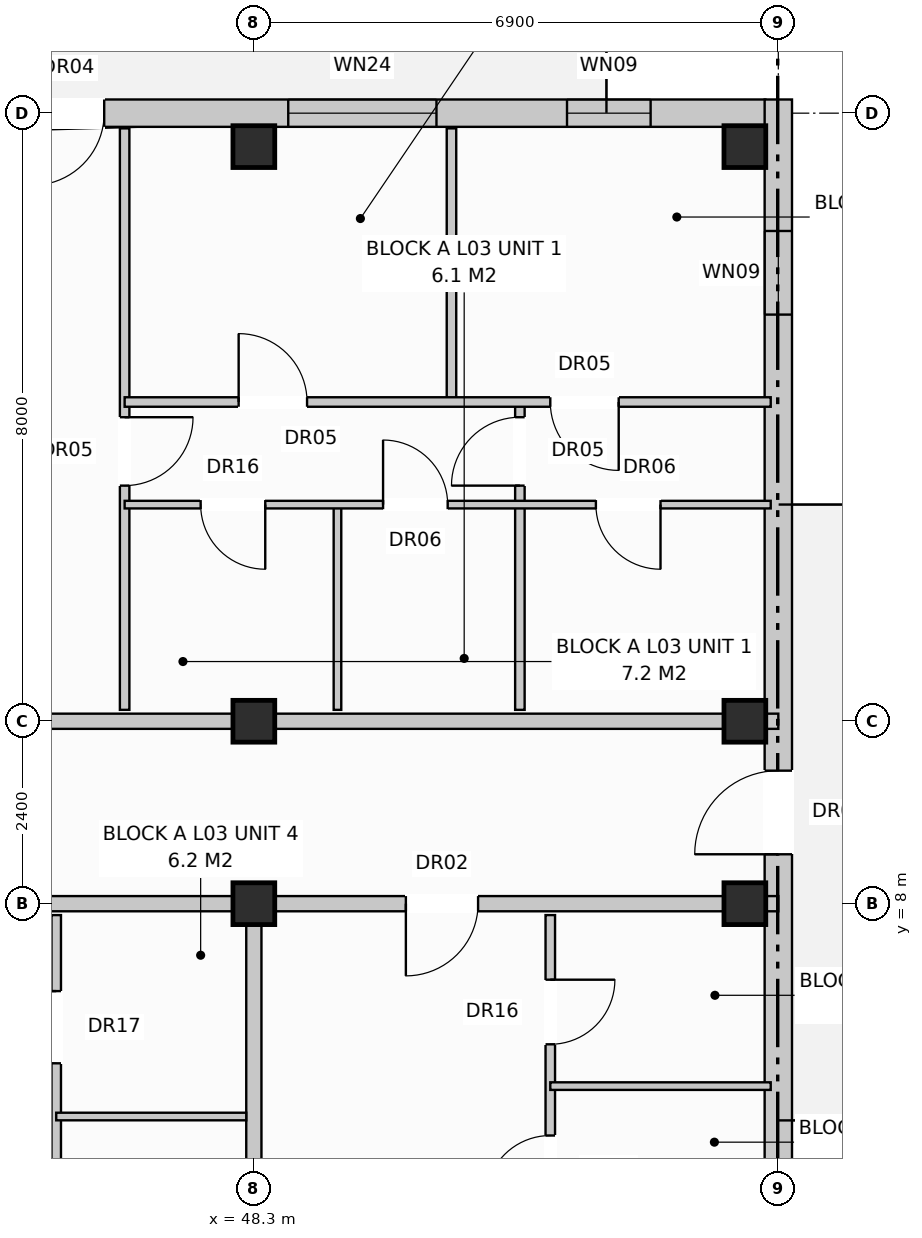
"""IFC4 building model, lengths in metres.
Left out: names, types, materials, properties, quantities, classifications, styles, units other than length and angle.
Written with IfcOpenShell. Run it as: python <this file> out.ifc"""

import sys

from ifc_helpers import new_model, si_unit, direction, frame, frame_2d, origin, origin_with_axes, origin_2d, place, context, subcontext, project, spatial, rectangle, extrude, element, fill, save


model = new_model("IFC4")
c1 = context("Model", 3, precision=1e-05, world=origin(), true_north=direction((0.0, 1.0)))
c2 = subcontext(c1, "Body", "Model", "MODEL_VIEW")
j1 = project(units=[si_unit("LENGTHUNIT", "METRE"), si_unit("PLANEANGLEUNIT", "RADIAN")], contexts=[c1])
p1 = place(None, origin())
s1 = spatial("IfcSite", under=j1, at=p1, CompositionType="ELEMENT")
p2 = place(p1, origin())
s2 = spatial("IfcBuilding", under=s1, at=p2, CompositionType="ELEMENT")
p3 = place(p2, frame((0.0, 0.0, 11.2)))
s3 = spatial("IfcBuildingStorey", under=s2, at=p3, CompositionType="ELEMENT", Elevation=11.2)
for number, where, z_axis, x_axis in (
    (1, (48.3, 8.0, 0.0), (0.0, 0.0, 1.0), (1.0, 0.0, 0.0)),
    (2, (48.3, 10.4, 0.0), (0.0, 0.0, 1.0), (1.0, 0.0, 0.0)),
    (3, (48.3, 17.96, 0.0), (0.0, 0.0, 1.0), (1.0, 0.0, 0.0)),
    (4, (54.76, 8.0, 0.0), (0.0, 0.0, 1.0), (1.0, 0.0, 0.0)),
    (5, (54.76, 10.4, 0.0), (0.0, 0.0, 1.0), (1.0, 0.0, 0.0)),
    (6, (54.76, 17.96, 0.0), (0.0, 0.0, 1.0), (1.0, 0.0, 0.0)),
):
    element("IfcColumn", number, at=place(p3, frame(where, z_axis=z_axis, x_axis=x_axis)), inside=s3, PredefinedType="COLUMN", context=c2, shape_type="SweptSolid", body=[
        extrude(rectangle(XDim=0.55, YDim=0.55, at=origin_2d()), origin(), (0.0, 0.0, 1.0), 3.2),
    ])
p4 = place(p3, frame((31.35, 18.4, 0.0), z_axis=(0.0, 0.0, 1.0), x_axis=(1.0, 0.0, 0.0)))
e7 = element("IfcWall", 7, at=p4, inside=s3, PredefinedType="STANDARD", context=c2, shape_type="SweptSolid", body=[
    extrude(rectangle(XDim=23.68, YDim=0.36, at=frame_2d((11.84, 0.0))), origin(), (0.0, 0.0, 1.0), 2.94),
])
p5 = place(p4, frame((14.031, 0.0, 0.0)))
e8 = element("IfcOpeningElement", 8, at=p5, cuts=e7, PredefinedType="OPENING", context=c2, shape_type="SweptSolid", body=[
    extrude(rectangle(XDim=0.95, YDim=2.1, at=frame_2d((0.475, 1.05))), frame((0.0, 0.192, 0.0), z_axis=(0.0, -1.0, 0.0), x_axis=(1.0, 0.0, 0.0)), (0.0, 0.0, 1.0), 0.384),
])
p6 = place(p4, frame((11.77, 0.0, 0.8)))
e9 = element("IfcOpeningElement", 9, at=p6, cuts=e7, PredefinedType="OPENING", context=c2, shape_type="SweptSolid", body=[
    extrude(rectangle(XDim=1.9, YDim=1.85, at=frame_2d((0.95, 0.925))), frame((0.0, 0.192, 0.0), z_axis=(0.0, -1.0, 0.0), x_axis=(1.0, 0.0, 0.0)), (0.0, 0.0, 1.0), 0.384),
])
p7 = place(p4, frame((17.403, 0.0, 0.8)))
e10 = element("IfcOpeningElement", 10, at=p7, cuts=e7, PredefinedType="OPENING", context=c2, shape_type="SweptSolid", body=[
    extrude(rectangle(XDim=1.95, YDim=1.65, at=frame_2d((0.975, 0.825))), frame((0.0, 0.192, 0.0), z_axis=(0.0, -1.0, 0.0), x_axis=(1.0, 0.0, 0.0)), (0.0, 0.0, 1.0), 0.384),
])
p8 = place(p4, frame((21.07, 0.0, 0.72)))
e11 = element("IfcOpeningElement", 11, at=p8, cuts=e7, PredefinedType="OPENING", context=c2, shape_type="SweptSolid", body=[
    extrude(rectangle(XDim=1.1, YDim=1.5, at=frame_2d((0.55, 0.75))), frame((0.0, 0.192, 0.0), z_axis=(0.0, -1.0, 0.0), x_axis=(1.0, 0.0, 0.0)), (0.0, 0.0, 1.0), 0.384),
])
p9 = place(p3, frame((55.2, -0.18, 0.0), z_axis=(0.0, 0.0, 1.0), x_axis=(0.0, 1.0, 0.0)))
e12 = element("IfcWall", 12, at=p9, inside=s3, PredefinedType="STANDARD", context=c2, shape_type="SweptSolid", body=[
    extrude(rectangle(XDim=18.76, YDim=0.36, at=frame_2d((9.38, 0.0))), origin(), (0.0, 0.0, 1.0), 2.94),
])
p10 = place(p9, frame((8.83, 0.0, 0.0)))
e13 = element("IfcOpeningElement", 13, at=p10, cuts=e12, PredefinedType="OPENING", context=c2, shape_type="SweptSolid", body=[
    extrude(rectangle(XDim=1.1, YDim=2.1, at=frame_2d((0.55, 1.05))), frame((0.0, 0.192, 0.0), z_axis=(0.0, -1.0, 0.0), x_axis=(1.0, 0.0, 0.0)), (0.0, 0.0, 1.0), 0.384),
])
p11 = place(p9, frame((1.73, 0.0, 0.72)))
e14 = element("IfcOpeningElement", 14, at=p11, cuts=e12, PredefinedType="OPENING", context=c2, shape_type="SweptSolid", body=[
    extrude(rectangle(XDim=1.1, YDim=1.5, at=frame_2d((0.55, 0.75))), frame((0.0, 0.192, 0.0), z_axis=(0.0, -1.0, 0.0), x_axis=(1.0, 0.0, 0.0)), (0.0, 0.0, 1.0), 0.384),
])
p12 = place(p9, frame((15.93, 0.0, 0.72)))
e15 = element("IfcOpeningElement", 15, at=p12, cuts=e12, PredefinedType="OPENING", context=c2, shape_type="SweptSolid", body=[
    extrude(rectangle(XDim=1.1, YDim=1.5, at=frame_2d((0.55, 0.75))), frame((0.0, 0.192, 0.0), z_axis=(0.0, -1.0, 0.0), x_axis=(1.0, 0.0, 0.0)), (0.0, 0.0, 1.0), 0.384),
])
p13 = place(p3, frame((48.3, 7.85, 0.0), z_axis=(0.0, 0.0, 1.0), x_axis=(0.0, -1.0, 0.0)))
e16 = element("IfcWall", 16, at=p13, inside=s3, PredefinedType="PARTITIONING", context=c2, shape_type="SweptSolid", body=[
    extrude(rectangle(XDim=7.7, YDim=0.2, at=frame_2d((3.85, 0.0))), origin(), (0.0, 0.0, 1.0), 2.38),
])
p14 = place(p3, frame((41.4, 8.0, 0.0), z_axis=(0.0, 0.0, 1.0), x_axis=(1.0, 0.0, 0.0)))
e17 = element("IfcWall", 17, at=p14, inside=s3, PredefinedType="PARTITIONING", context=c2, shape_type="SweptSolid", body=[
    extrude(rectangle(XDim=6.9, YDim=0.2, at=frame_2d((3.45, 0.0))), origin(), (0.0, 0.0, 1.0), 2.38),
])
p15 = place(p14, frame((2.0, 0.0, 0.0)))
e18 = element("IfcOpeningElement", 18, at=p15, cuts=e17, PredefinedType="OPENING", context=c2, shape_type="SweptSolid", body=[
    extrude(rectangle(XDim=0.95, YDim=2.15, at=frame_2d((0.475, 1.075))), frame((0.0, 0.112, 0.0), z_axis=(0.0, -1.0, 0.0), x_axis=(1.0, 0.0, 0.0)), (0.0, 0.0, 1.0), 0.224),
])
p16 = place(p3, frame((45.7, 7.85, 0.0), z_axis=(0.0, 0.0, 1.0), x_axis=(0.0, -1.0, 0.0)))
e19 = element("IfcWall", 19, at=p16, inside=s3, PredefinedType="PARTITIONING", context=c2, shape_type="SweptSolid", body=[
    extrude(rectangle(XDim=7.65, YDim=0.125, at=frame_2d((3.825, 0.0))), origin(), (0.0, 0.0, 1.0), 2.94),
])
p17 = place(p16, frame((1.0, 0.0, 0.0)))
e20 = element("IfcOpeningElement", 20, at=p17, cuts=e19, PredefinedType="OPENING", context=c2, shape_type="SweptSolid", body=[
    extrude(rectangle(XDim=0.95, YDim=2.1, at=frame_2d((0.475, 1.05))), frame((0.0, 0.074, 0.0), z_axis=(0.0, -1.0, 0.0), x_axis=(1.0, 0.0, 0.0)), (0.0, 0.0, 1.0), 0.149),
])
p18 = place(p16, frame((4.2, 0.0, 0.0)))
e21 = element("IfcOpeningElement", 21, at=p18, cuts=e19, PredefinedType="OPENING", context=c2, shape_type="SweptSolid", body=[
    extrude(rectangle(XDim=0.9, YDim=2.1, at=frame_2d((0.45, 1.05))), frame((0.0, 0.074, 0.0), z_axis=(0.0, -1.0, 0.0), x_axis=(1.0, 0.0, 0.0)), (0.0, 0.0, 1.0), 0.149),
])
p19 = place(p3, frame((45.7, 5.2, 0.0), z_axis=(0.0, 0.0, 1.0), x_axis=(1.0, 0.0, 0.0)))
e22 = element("IfcWall", 22, at=p19, inside=s3, PredefinedType="PARTITIONING", context=c2, shape_type="SweptSolid", body=[
    extrude(rectangle(XDim=2.5, YDim=0.1, at=frame_2d((1.25, 0.0))), origin(), (0.0, 0.0, 1.0), 2.94),
])
p20 = place(p3, frame((48.3, 8.0, 0.0), z_axis=(0.0, 0.0, 1.0), x_axis=(1.0, 0.0, 0.0)))
e23 = element("IfcWall", 23, at=p20, inside=s3, PredefinedType="PARTITIONING", context=c2, shape_type="SweptSolid", body=[
    extrude(rectangle(XDim=6.9, YDim=0.2, at=frame_2d((3.45, 0.0))), origin(), (0.0, 0.0, 1.0), 2.38),
])
p21 = place(p20, frame((2.0, 0.0, 0.0)))
e24 = element("IfcOpeningElement", 24, at=p21, cuts=e23, PredefinedType="OPENING", context=c2, shape_type="SweptSolid", body=[
    extrude(rectangle(XDim=0.95, YDim=2.15, at=frame_2d((0.475, 1.075))), frame((0.0, 0.112, 0.0), z_axis=(0.0, -1.0, 0.0), x_axis=(1.0, 0.0, 0.0)), (0.0, 0.0, 1.0), 0.224),
])
p22 = place(p3, frame((52.2, 7.85, 0.0), z_axis=(0.0, 0.0, 1.0), x_axis=(0.0, -1.0, 0.0)))
e25 = element("IfcWall", 25, at=p22, inside=s3, PredefinedType="PARTITIONING", context=c2, shape_type="SweptSolid", body=[
    extrude(rectangle(XDim=7.65, YDim=0.125, at=frame_2d((3.825, 0.0))), origin(), (0.0, 0.0, 1.0), 2.94),
])
p23 = place(p22, frame((0.85, 0.0, 0.0)))
e26 = element("IfcOpeningElement", 26, at=p23, cuts=e25, PredefinedType="OPENING", context=c2, shape_type="SweptSolid", body=[
    extrude(rectangle(XDim=0.85, YDim=2.1, at=frame_2d((0.425, 1.05))), frame((0.0, 0.074, 0.0), z_axis=(0.0, -1.0, 0.0), x_axis=(1.0, 0.0, 0.0)), (0.0, 0.0, 1.0), 0.149),
])
p24 = place(p22, frame((2.9, 0.0, 0.0)))
e27 = element("IfcOpeningElement", 27, at=p24, cuts=e25, PredefinedType="OPENING", context=c2, shape_type="SweptSolid", body=[
    extrude(rectangle(XDim=0.85, YDim=2.05, at=frame_2d((0.425, 1.025))), frame((0.0, 0.074, 0.0), z_axis=(0.0, -1.0, 0.0), x_axis=(1.0, 0.0, 0.0)), (0.0, 0.0, 1.0), 0.149),
])
p25 = place(p22, frame((5.3, 0.0, 0.0)))
e28 = element("IfcOpeningElement", 28, at=p25, cuts=e25, PredefinedType="OPENING", context=c2, shape_type="SweptSolid", body=[
    extrude(rectangle(XDim=0.9, YDim=2.1, at=frame_2d((0.45, 1.05))), frame((0.0, 0.074, 0.0), z_axis=(0.0, -1.0, 0.0), x_axis=(1.0, 0.0, 0.0)), (0.0, 0.0, 1.0), 0.149),
])
p26 = place(p3, frame((52.2, 5.6, 0.0), z_axis=(0.0, 0.0, 1.0), x_axis=(1.0, 0.0, 0.0)))
e29 = element("IfcWall", 29, at=p26, inside=s3, PredefinedType="PARTITIONING", context=c2, shape_type="SweptSolid", body=[
    extrude(rectangle(XDim=2.9, YDim=0.1, at=frame_2d((1.45, 0.0))), origin(), (0.0, 0.0, 1.0), 2.94),
])
p27 = place(p3, frame((41.4, 10.4, 0.0), z_axis=(0.0, 0.0, 1.0), x_axis=(1.0, 0.0, 0.0)))
e30 = element("IfcWall", 30, at=p27, inside=s3, PredefinedType="PARTITIONING", context=c2, shape_type="SweptSolid", body=[
    extrude(rectangle(XDim=13.8, YDim=0.2, at=frame_2d((6.9, 0.0))), origin(), (0.0, 0.0, 1.0), 2.38),
])
p28 = place(p27, frame((2.4, 0.0, 0.0)))
e31 = element("IfcOpeningElement", 31, at=p28, cuts=e30, PredefinedType="OPENING", context=c2, shape_type="SweptSolid", body=[
    extrude(rectangle(XDim=0.95, YDim=2.15, at=frame_2d((0.475, 1.075))), frame((0.0, 0.112, 0.0), z_axis=(0.0, -1.0, 0.0), x_axis=(1.0, 0.0, 0.0)), (0.0, 0.0, 1.0), 0.224),
])
p29 = place(p3, frame((46.6, 10.55, 0.0), z_axis=(0.0, 0.0, 1.0), x_axis=(0.0, 1.0, 0.0)))
e32 = element("IfcWall", 32, at=p29, inside=s3, PredefinedType="PARTITIONING", context=c2, shape_type="SweptSolid", body=[
    extrude(rectangle(XDim=7.65, YDim=0.125, at=frame_2d((3.825, 0.0))), origin(), (0.0, 0.0, 1.0), 2.94),
])
p30 = place(p29, frame((2.95, 0.0, 0.0)))
e33 = element("IfcOpeningElement", 33, at=p30, cuts=e32, PredefinedType="OPENING", context=c2, shape_type="SweptSolid", body=[
    extrude(rectangle(XDim=0.9, YDim=2.1, at=frame_2d((0.45, 1.05))), frame((0.0, 0.074, 0.0), z_axis=(0.0, -1.0, 0.0), x_axis=(1.0, 0.0, 0.0)), (0.0, 0.0, 1.0), 0.149),
])
p31 = place(p3, frame((49.4, 10.55, 0.0), z_axis=(0.0, 0.0, 1.0), x_axis=(0.0, 1.0, 0.0)))
e34 = element("IfcWall", 34, at=p31, inside=s3, PredefinedType="PARTITIONING", context=c2, shape_type="SweptSolid", body=[
    extrude(rectangle(XDim=2.7, YDim=0.1, at=frame_2d((1.35, 0.0))), origin(), (0.0, 0.0, 1.0), 2.94),
])
p32 = place(p3, frame((51.8, 10.55, 0.0), z_axis=(0.0, 0.0, 1.0), x_axis=(0.0, 1.0, 0.0)))
e35 = element("IfcWall", 35, at=p32, inside=s3, PredefinedType="PARTITIONING", context=c2, shape_type="SweptSolid", body=[
    extrude(rectangle(XDim=4.05, YDim=0.125, at=frame_2d((2.025, 0.0))), origin(), (0.0, 0.0, 1.0), 2.94),
])
p33 = place(p32, frame((2.95, 0.0, 0.0)))
e36 = element("IfcOpeningElement", 36, at=p33, cuts=e35, PredefinedType="OPENING", context=c2, shape_type="SweptSolid", body=[
    extrude(rectangle(XDim=0.9, YDim=2.1, at=frame_2d((0.45, 1.05))), frame((0.0, 0.074, 0.0), z_axis=(0.0, -1.0, 0.0), x_axis=(1.0, 0.0, 0.0)), (0.0, 0.0, 1.0), 0.149),
])
p34 = place(p3, frame((50.9, 14.6, 0.0), z_axis=(0.0, 0.0, 1.0), x_axis=(0.0, 1.0, 0.0)))
e37 = element("IfcWall", 37, at=p34, inside=s3, PredefinedType="PARTITIONING", context=c2, shape_type="SweptSolid", body=[
    extrude(rectangle(XDim=3.6, YDim=0.125, at=frame_2d((1.8, 0.0))), origin(), (0.0, 0.0, 1.0), 2.94),
])
p35 = place(p3, frame((46.6, 13.25, 0.0), z_axis=(0.0, 0.0, 1.0), x_axis=(1.0, 0.0, 0.0)))
e38 = element("IfcWall", 38, at=p35, inside=s3, PredefinedType="PARTITIONING", context=c2, shape_type="SweptSolid", body=[
    extrude(rectangle(XDim=8.5, YDim=0.1, at=frame_2d((4.25, 0.0))), origin(), (0.0, 0.0, 1.0), 2.94),
])
p36 = place(p35, frame((1.0, 0.0, 0.0)))
e39 = element("IfcOpeningElement", 39, at=p36, cuts=e38, PredefinedType="OPENING", context=c2, shape_type="SweptSolid", body=[
    extrude(rectangle(XDim=0.85, YDim=2.1, at=frame_2d((0.425, 1.05))), frame((0.0, 0.062, 0.0), z_axis=(0.0, -1.0, 0.0), x_axis=(1.0, 0.0, 0.0)), (0.0, 0.0, 1.0), 0.124),
])
p37 = place(p35, frame((3.4, 0.0, 0.0)))
e40 = element("IfcOpeningElement", 40, at=p37, cuts=e38, PredefinedType="OPENING", context=c2, shape_type="SweptSolid", body=[
    extrude(rectangle(XDim=0.85, YDim=2.05, at=frame_2d((0.425, 1.025))), frame((0.0, 0.062, 0.0), z_axis=(0.0, -1.0, 0.0), x_axis=(1.0, 0.0, 0.0)), (0.0, 0.0, 1.0), 0.124),
])
p38 = place(p35, frame((6.2, 0.0, 0.0)))
e41 = element("IfcOpeningElement", 41, at=p38, cuts=e38, PredefinedType="OPENING", context=c2, shape_type="SweptSolid", body=[
    extrude(rectangle(XDim=0.85, YDim=2.05, at=frame_2d((0.425, 1.025))), frame((0.0, 0.062, 0.0), z_axis=(0.0, -1.0, 0.0), x_axis=(1.0, 0.0, 0.0)), (0.0, 0.0, 1.0), 0.124),
])
p39 = place(p3, frame((46.6, 14.6, 0.0), z_axis=(0.0, 0.0, 1.0), x_axis=(1.0, 0.0, 0.0)))
e42 = element("IfcWall", 42, at=p39, inside=s3, PredefinedType="PARTITIONING", context=c2, shape_type="SweptSolid", body=[
    extrude(rectangle(XDim=8.5, YDim=0.125, at=frame_2d((4.25, 0.0))), origin(), (0.0, 0.0, 1.0), 2.94),
])
p40 = place(p39, frame((1.5, 0.0, 0.0)))
e43 = element("IfcOpeningElement", 43, at=p40, cuts=e42, PredefinedType="OPENING", context=c2, shape_type="SweptSolid", body=[
    extrude(rectangle(XDim=0.9, YDim=2.1, at=frame_2d((0.45, 1.05))), frame((0.0, 0.074, 0.0), z_axis=(0.0, -1.0, 0.0), x_axis=(1.0, 0.0, 0.0)), (0.0, 0.0, 1.0), 0.149),
])
p41 = place(p39, frame((5.6, 0.0, 0.0)))
e44 = element("IfcOpeningElement", 44, at=p41, cuts=e42, PredefinedType="OPENING", context=c2, shape_type="SweptSolid", body=[
    extrude(rectangle(XDim=0.9, YDim=2.1, at=frame_2d((0.45, 1.05))), frame((0.0, 0.074, 0.0), z_axis=(0.0, -1.0, 0.0), x_axis=(1.0, 0.0, 0.0)), (0.0, 0.0, 1.0), 0.149),
])
p42 = place(p5, frame((0.95, 0.0, 0.0), z_axis=(0.0, 0.0, 1.0), x_axis=(-1.0, 0.0, 0.0)))
e45 = element("IfcDoor", 45, at=p42, inside=s3, OperationType="SINGLE_SWING_LEFT", PredefinedType="DOOR", context=c2, shape_type="SweptSolid", body=[
    extrude(rectangle(XDim=0.95, YDim=2.1, at=frame_2d((0.475, 1.05))), frame((0.0, 0.025, 0.0), z_axis=(0.0, -1.0, 0.0), x_axis=(1.0, 0.0, 0.0)), (0.0, 0.0, 1.0), 0.05),
])
fill(e8, e45)
p43 = place(p7, origin_with_axes())
e46 = element("IfcWindow", 46, at=p43, inside=s3, PartitioningType="SINGLE_PANEL", PredefinedType="WINDOW", context=c2, shape_type="SweptSolid", body=[
    extrude(rectangle(XDim=1.95, YDim=1.65, at=frame_2d((0.975, 0.825))), frame((0.0, 0.03, 0.0), z_axis=(0.0, -1.0, 0.0), x_axis=(1.0, 0.0, 0.0)), (0.0, 0.0, 1.0), 0.06),
])
fill(e10, e46)
p44 = place(p8, origin_with_axes())
e47 = element("IfcWindow", 47, at=p44, inside=s3, PartitioningType="SINGLE_PANEL", PredefinedType="WINDOW", context=c2, shape_type="SweptSolid", body=[
    extrude(rectangle(XDim=1.1, YDim=1.5, at=frame_2d((0.55, 0.75))), frame((0.0, 0.03, 0.0), z_axis=(0.0, -1.0, 0.0), x_axis=(1.0, 0.0, 0.0)), (0.0, 0.0, 1.0), 0.06),
])
fill(e11, e47)
p45 = place(p10, origin_with_axes())
e48 = element("IfcDoor", 48, at=p45, inside=s3, OperationType="SINGLE_SWING_LEFT", PredefinedType="DOOR", context=c2, shape_type="SweptSolid", body=[
    extrude(rectangle(XDim=1.1, YDim=2.1, at=frame_2d((0.55, 1.05))), frame((0.0, 0.025, 0.0), z_axis=(0.0, -1.0, 0.0), x_axis=(1.0, 0.0, 0.0)), (0.0, 0.0, 1.0), 0.05),
])
fill(e13, e48)
p46 = place(p12, origin_with_axes())
e49 = element("IfcWindow", 49, at=p46, inside=s3, PartitioningType="SINGLE_PANEL", PredefinedType="WINDOW", context=c2, shape_type="SweptSolid", body=[
    extrude(rectangle(XDim=1.1, YDim=1.5, at=frame_2d((0.55, 0.75))), frame((0.0, 0.03, 0.0), z_axis=(0.0, -1.0, 0.0), x_axis=(1.0, 0.0, 0.0)), (0.0, 0.0, 1.0), 0.06),
])
fill(e15, e49)
p47 = place(p17, frame((0.95, 0.0, 0.0), z_axis=(0.0, 0.0, 1.0), x_axis=(-1.0, 0.0, 0.0)))
e50 = element("IfcDoor", 50, at=p47, inside=s3, OperationType="SINGLE_SWING_LEFT", PredefinedType="DOOR", context=c2, shape_type="SweptSolid", body=[
    extrude(rectangle(XDim=0.95, YDim=2.1, at=frame_2d((0.475, 1.05))), frame((0.0, 0.025, 0.0), z_axis=(0.0, -1.0, 0.0), x_axis=(1.0, 0.0, 0.0)), (0.0, 0.0, 1.0), 0.05),
])
fill(e20, e50)
p48 = place(p21, frame((0.95, 0.0, 0.0), z_axis=(0.0, 0.0, 1.0), x_axis=(-1.0, 0.0, 0.0)))
e51 = element("IfcDoor", 51, at=p48, inside=s3, OperationType="SINGLE_SWING_LEFT", PredefinedType="DOOR", context=c2, shape_type="SweptSolid", body=[
    extrude(rectangle(XDim=0.95, YDim=2.15, at=frame_2d((0.475, 1.075))), frame((0.0, 0.025, 0.0), z_axis=(0.0, -1.0, 0.0), x_axis=(1.0, 0.0, 0.0)), (0.0, 0.0, 1.0), 0.05),
])
fill(e24, e51)
p49 = place(p23, origin_with_axes())
e52 = element("IfcDoor", 52, at=p49, inside=s3, OperationType="SINGLE_SWING_LEFT", PredefinedType="DOOR", context=c2, shape_type="SweptSolid", body=[
    extrude(rectangle(XDim=0.85, YDim=2.1, at=frame_2d((0.425, 1.05))), frame((0.0, 0.025, 0.0), z_axis=(0.0, -1.0, 0.0), x_axis=(1.0, 0.0, 0.0)), (0.0, 0.0, 1.0), 0.05),
])
fill(e26, e52)
p50 = place(p24, frame((0.85, 0.0, 0.0), z_axis=(0.0, 0.0, 1.0), x_axis=(-1.0, 0.0, 0.0)))
e53 = element("IfcDoor", 53, at=p50, inside=s3, OperationType="SINGLE_SWING_RIGHT", PredefinedType="DOOR", context=c2, shape_type="SweptSolid", body=[
    extrude(rectangle(XDim=0.85, YDim=2.05, at=frame_2d((0.425, 1.025))), frame((0.0, 0.025, 0.0), z_axis=(0.0, -1.0, 0.0), x_axis=(1.0, 0.0, 0.0)), (0.0, 0.0, 1.0), 0.05),
])
fill(e27, e53)
p51 = place(p30, frame((0.9, 0.0, 0.0), z_axis=(0.0, 0.0, 1.0), x_axis=(-1.0, 0.0, 0.0)))
e54 = element("IfcDoor", 54, at=p51, inside=s3, OperationType="SINGLE_SWING_RIGHT", PredefinedType="DOOR", context=c2, shape_type="SweptSolid", body=[
    extrude(rectangle(XDim=0.9, YDim=2.1, at=frame_2d((0.45, 1.05))), frame((0.0, 0.025, 0.0), z_axis=(0.0, -1.0, 0.0), x_axis=(1.0, 0.0, 0.0)), (0.0, 0.0, 1.0), 0.05),
])
fill(e33, e54)
p52 = place(p33, origin_with_axes())
e55 = element("IfcDoor", 55, at=p52, inside=s3, OperationType="SINGLE_SWING_LEFT", PredefinedType="DOOR", context=c2, shape_type="SweptSolid", body=[
    extrude(rectangle(XDim=0.9, YDim=2.1, at=frame_2d((0.45, 1.05))), frame((0.0, 0.025, 0.0), z_axis=(0.0, -1.0, 0.0), x_axis=(1.0, 0.0, 0.0)), (0.0, 0.0, 1.0), 0.05),
])
fill(e36, e55)
p53 = place(p36, frame((0.85, 0.0, 0.0), z_axis=(0.0, 0.0, 1.0), x_axis=(-1.0, 0.0, 0.0)))
e56 = element("IfcDoor", 56, at=p53, inside=s3, OperationType="SINGLE_SWING_RIGHT", PredefinedType="DOOR", context=c2, shape_type="SweptSolid", body=[
    extrude(rectangle(XDim=0.85, YDim=2.1, at=frame_2d((0.425, 1.05))), frame((0.0, 0.025, 0.0), z_axis=(0.0, -1.0, 0.0), x_axis=(1.0, 0.0, 0.0)), (0.0, 0.0, 1.0), 0.05),
])
fill(e39, e56)
p54 = place(p37, origin_with_axes())
e57 = element("IfcDoor", 57, at=p54, inside=s3, OperationType="SINGLE_SWING_LEFT", PredefinedType="DOOR", context=c2, shape_type="SweptSolid", body=[
    extrude(rectangle(XDim=0.85, YDim=2.05, at=frame_2d((0.425, 1.025))), frame((0.0, 0.025, 0.0), z_axis=(0.0, -1.0, 0.0), x_axis=(1.0, 0.0, 0.0)), (0.0, 0.0, 1.0), 0.05),
])
fill(e40, e57)
p55 = place(p38, frame((0.85, 0.0, 0.0), z_axis=(0.0, 0.0, 1.0), x_axis=(-1.0, 0.0, 0.0)))
e58 = element("IfcDoor", 58, at=p55, inside=s3, OperationType="SINGLE_SWING_RIGHT", PredefinedType="DOOR", context=c2, shape_type="SweptSolid", body=[
    extrude(rectangle(XDim=0.85, YDim=2.05, at=frame_2d((0.425, 1.025))), frame((0.0, 0.025, 0.0), z_axis=(0.0, -1.0, 0.0), x_axis=(1.0, 0.0, 0.0)), (0.0, 0.0, 1.0), 0.05),
])
fill(e41, e58)
p56 = place(p40, origin_with_axes())
e59 = element("IfcDoor", 59, at=p56, inside=s3, OperationType="SINGLE_SWING_LEFT", PredefinedType="DOOR", context=c2, shape_type="SweptSolid", body=[
    extrude(rectangle(XDim=0.9, YDim=2.1, at=frame_2d((0.45, 1.05))), frame((0.0, 0.025, 0.0), z_axis=(0.0, -1.0, 0.0), x_axis=(1.0, 0.0, 0.0)), (0.0, 0.0, 1.0), 0.05),
])
fill(e43, e59)
p57 = place(p41, frame((0.9, 0.0, 0.0), z_axis=(0.0, 0.0, 1.0), x_axis=(-1.0, 0.0, 0.0)))
e60 = element("IfcDoor", 60, at=p57, inside=s3, OperationType="SINGLE_SWING_RIGHT", PredefinedType="DOOR", context=c2, shape_type="SweptSolid", body=[
    extrude(rectangle(XDim=0.9, YDim=2.1, at=frame_2d((0.45, 1.05))), frame((0.0, 0.025, 0.0), z_axis=(0.0, -1.0, 0.0), x_axis=(1.0, 0.0, 0.0)), (0.0, 0.0, 1.0), 0.05),
])
fill(e44, e60)
save(model, sys.argv[1])
